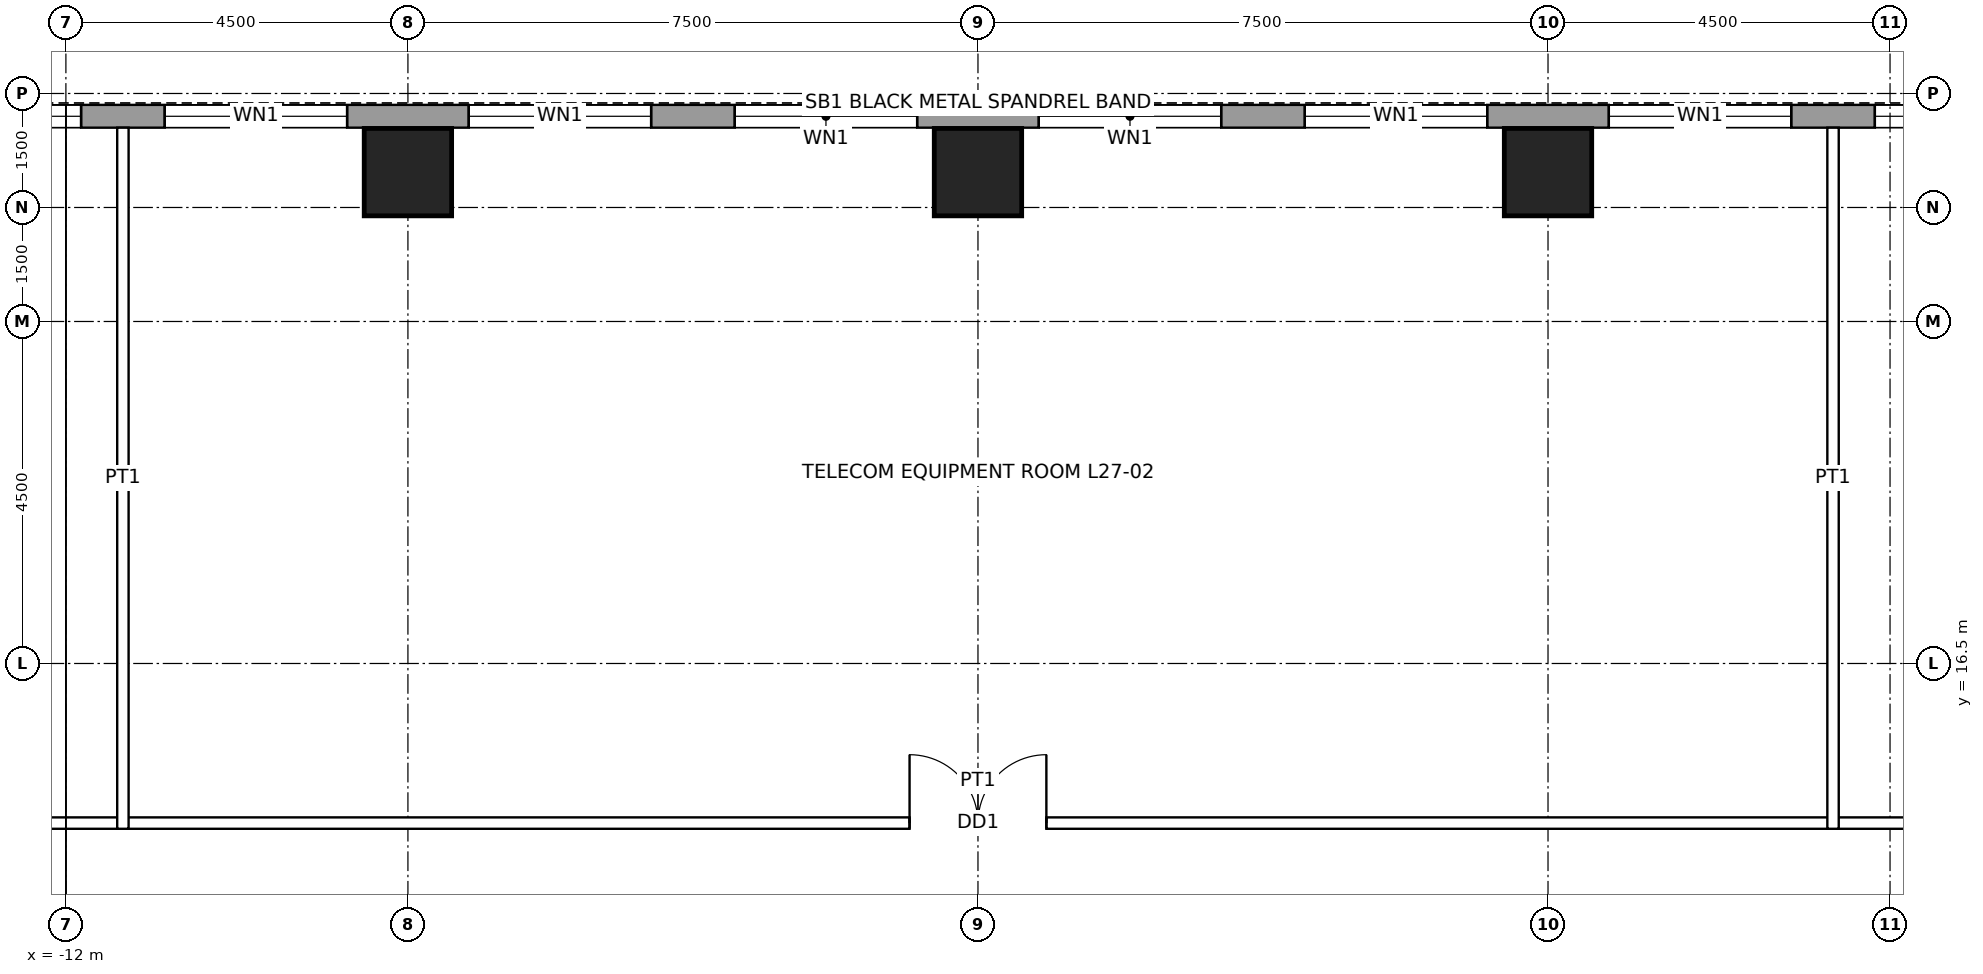
"""IFC4 building model, lengths in metres.
Left out: names, types, materials, properties, quantities, classifications, styles, units other than length and angle.
Written with IfcOpenShell. Run it as: python <this file> out.ifc"""

import sys

from ifc_helpers import new_model, si_unit, direction, frame, frame_2d, origin, origin_2d, place, context, subcontext, project, spatial, rectangle, hollow_rectangle, extrude, element, fill, save


model = new_model("IFC4")
c1 = context("Model", 3, precision=1e-05, world=origin(), true_north=direction((0.0, 1.0)))
c2 = subcontext(c1, "Body", "Model", "MODEL_VIEW")
j1 = project(units=[si_unit("LENGTHUNIT", "METRE"), si_unit("PLANEANGLEUNIT", "RADIAN")], contexts=[c1])
p1 = place(None, origin())
s1 = spatial("IfcSite", under=j1, at=p1, CompositionType="ELEMENT")
p2 = place(p1, origin())
s2 = spatial("IfcBuilding", under=s1, at=p2, CompositionType="ELEMENT")
p3 = place(p2, frame((0.0, 0.0, 135.9)))
s3 = spatial("IfcBuildingStorey", under=s2, at=p3, CompositionType="ELEMENT", Elevation=135.9)
for number, where, z_axis, x_axis in (
    (1, (-7.5, 22.965, 0.0), (0.0, 0.0, 1.0), (1.0, 0.0, 0.0)),
    (2, (0.0, 22.965, 0.0), (0.0, 0.0, 1.0), (1.0, 0.0, 0.0)),
    (3, (7.5, 22.965, 0.0), (0.0, 0.0, 1.0), (1.0, 0.0, 0.0)),
):
    element("IfcColumn", number, at=place(p3, frame(where, z_axis=z_axis, x_axis=x_axis)), inside=s3, PredefinedType="COLUMN", context=c2, shape_type="SweptSolid", body=[
        extrude(hollow_rectangle(XDim=1.15, YDim=1.15, WallThickness=0.075, at=origin_2d()), origin(), (0.0, 0.0, 1.0), 4.5),
    ])
p4 = place(p3, frame((-16.2, 23.7, 0.0), z_axis=(0.0, 0.0, 1.0), x_axis=(1.0, 0.0, 0.0)))
e4 = element("IfcWall", 4, at=p4, inside=s3, PredefinedType="SOLIDWALL", context=c2, shape_type="SweptSolid", body=[
    extrude(rectangle(XDim=32.4, YDim=0.3, at=frame_2d((16.2, 0.0))), origin(), (0.0, 0.0, 1.0), 4.3),
])
p5 = place(p4, frame((2.0, 0.0, 1.0)))
e5 = element("IfcOpeningElement", 5, at=p5, cuts=e4, PredefinedType="OPENING", context=c2, shape_type="SweptSolid", body=[
    extrude(rectangle(XDim=2.4, YDim=1.2, at=frame_2d((1.2, 0.6))), frame((0.0, 0.16, 0.0), z_axis=(0.0, -1.0, 0.0), x_axis=(1.0, 0.0, 0.0)), (0.0, 0.0, 1.0), 0.32),
])
p6 = place(p4, frame((5.5, 0.0, 1.0)))
e6 = element("IfcOpeningElement", 6, at=p6, cuts=e4, PredefinedType="OPENING", context=c2, shape_type="SweptSolid", body=[
    extrude(rectangle(XDim=2.4, YDim=1.2, at=frame_2d((1.2, 0.6))), frame((0.0, 0.16, 0.0), z_axis=(0.0, -1.0, 0.0), x_axis=(1.0, 0.0, 0.0)), (0.0, 0.0, 1.0), 0.32),
])
p7 = place(p4, frame((9.5, 0.0, 1.0)))
e7 = element("IfcOpeningElement", 7, at=p7, cuts=e4, PredefinedType="OPENING", context=c2, shape_type="SweptSolid", body=[
    extrude(rectangle(XDim=2.4, YDim=1.2, at=frame_2d((1.2, 0.6))), frame((0.0, 0.16, 0.0), z_axis=(0.0, -1.0, 0.0), x_axis=(1.0, 0.0, 0.0)), (0.0, 0.0, 1.0), 0.32),
])
p8 = place(p4, frame((13.0, 0.0, 1.0)))
e8 = element("IfcOpeningElement", 8, at=p8, cuts=e4, PredefinedType="OPENING", context=c2, shape_type="SweptSolid", body=[
    extrude(rectangle(XDim=2.4, YDim=1.2, at=frame_2d((1.2, 0.6))), frame((0.0, 0.16, 0.0), z_axis=(0.0, -1.0, 0.0), x_axis=(1.0, 0.0, 0.0)), (0.0, 0.0, 1.0), 0.32),
])
p9 = place(p4, frame((17.0, 0.0, 1.0)))
e9 = element("IfcOpeningElement", 9, at=p9, cuts=e4, PredefinedType="OPENING", context=c2, shape_type="SweptSolid", body=[
    extrude(rectangle(XDim=2.4, YDim=1.2, at=frame_2d((1.2, 0.6))), frame((0.0, 0.16, 0.0), z_axis=(0.0, -1.0, 0.0), x_axis=(1.0, 0.0, 0.0)), (0.0, 0.0, 1.0), 0.32),
])
p10 = place(p4, frame((20.5, 0.0, 1.0)))
e10 = element("IfcOpeningElement", 10, at=p10, cuts=e4, PredefinedType="OPENING", context=c2, shape_type="SweptSolid", body=[
    extrude(rectangle(XDim=2.4, YDim=1.2, at=frame_2d((1.2, 0.6))), frame((0.0, 0.16, 0.0), z_axis=(0.0, -1.0, 0.0), x_axis=(1.0, 0.0, 0.0)), (0.0, 0.0, 1.0), 0.32),
])
p11 = place(p4, frame((24.5, 0.0, 1.0)))
e11 = element("IfcOpeningElement", 11, at=p11, cuts=e4, PredefinedType="OPENING", context=c2, shape_type="SweptSolid", body=[
    extrude(rectangle(XDim=2.4, YDim=1.2, at=frame_2d((1.2, 0.6))), frame((0.0, 0.16, 0.0), z_axis=(0.0, -1.0, 0.0), x_axis=(1.0, 0.0, 0.0)), (0.0, 0.0, 1.0), 0.32),
])
p12 = place(p4, frame((28.0, 0.0, 1.0)))
e12 = element("IfcOpeningElement", 12, at=p12, cuts=e4, PredefinedType="OPENING", context=c2, shape_type="SweptSolid", body=[
    extrude(rectangle(XDim=2.4, YDim=1.2, at=frame_2d((1.2, 0.6))), frame((0.0, 0.16, 0.0), z_axis=(0.0, -1.0, 0.0), x_axis=(1.0, 0.0, 0.0)), (0.0, 0.0, 1.0), 0.32),
])
p13 = place(p3, frame((-14.475, 14.4, 0.0), z_axis=(0.0, 0.0, 1.0), x_axis=(1.0, 0.0, 0.0)))
e13 = element("IfcWall", 13, at=p13, inside=s3, PredefinedType="PARTITIONING", context=c2, shape_type="SweptSolid", body=[
    extrude(rectangle(XDim=28.95, YDim=0.15, at=frame_2d((14.475, 0.0))), origin(), (0.0, 0.0, 1.0), 4.3),
])
p14 = place(p13, frame((13.575, 0.0, 0.0)))
e14 = element("IfcOpeningElement", 14, at=p14, cuts=e13, PredefinedType="OPENING", context=c2, shape_type="SweptSolid", body=[
    extrude(rectangle(XDim=1.8, YDim=2.4, at=frame_2d((0.9, 1.2))), frame((0.0, 0.085, 0.0), z_axis=(0.0, -1.0, 0.0), x_axis=(1.0, 0.0, 0.0)), (0.0, 0.0, 1.0), 0.17),
])
p15 = place(p13, frame((26.8, 0.0, 0.0)))
e15 = element("IfcOpeningElement", 15, at=p15, cuts=e13, PredefinedType="OPENING", context=c2, shape_type="SweptSolid", body=[
    extrude(rectangle(XDim=1.0, YDim=2.1, at=frame_2d((0.5, 1.05))), frame((0.0, 0.085, 0.0), z_axis=(0.0, -1.0, 0.0), x_axis=(1.0, 0.0, 0.0)), (0.0, 0.0, 1.0), 0.17),
])
p16 = place(p13, frame((1.15, 0.0, 0.0)))
e16 = element("IfcOpeningElement", 16, at=p16, cuts=e13, PredefinedType="OPENING", context=c2, shape_type="SweptSolid", body=[
    extrude(rectangle(XDim=1.0, YDim=2.1, at=frame_2d((0.5, 1.05))), frame((0.0, 0.085, 0.0), z_axis=(0.0, -1.0, 0.0), x_axis=(1.0, 0.0, 0.0)), (0.0, 0.0, 1.0), 0.17),
])
for number, where, z_axis, x_axis in (
    (17, (-11.25, 14.325, 0.0), (0.0, 0.0, 1.0), (0.0, 1.0, 0.0)),
    (18, (11.25, 14.325, 0.0), (0.0, 0.0, 1.0), (0.0, 1.0, 0.0)),
):
    element("IfcWall", number, at=place(p3, frame(where, z_axis=z_axis, x_axis=x_axis)), inside=s3, PredefinedType="PARTITIONING", context=c2, shape_type="SweptSolid", body=[
        extrude(rectangle(XDim=9.225, YDim=0.15, at=frame_2d((4.613, 0.0))), origin(), (0.0, 0.0, 1.0), 3.431),
    ])
p17 = place(p5, origin())
e19 = element("IfcWindow", 19, at=p17, inside=s3, PartitioningType="SINGLE_PANEL", PredefinedType="WINDOW", context=c2, shape_type="SweptSolid", body=[
    extrude(rectangle(XDim=2.4, YDim=1.2, at=frame_2d((1.2, 0.6))), frame((0.0, 0.03, 0.0), z_axis=(0.0, -1.0, 0.0), x_axis=(1.0, 0.0, 0.0)), (0.0, 0.0, 1.0), 0.06),
])
fill(e5, e19)
p18 = place(p6, origin())
e20 = element("IfcWindow", 20, at=p18, inside=s3, PartitioningType="SINGLE_PANEL", PredefinedType="WINDOW", context=c2, shape_type="SweptSolid", body=[
    extrude(rectangle(XDim=2.4, YDim=1.2, at=frame_2d((1.2, 0.6))), frame((0.0, 0.03, 0.0), z_axis=(0.0, -1.0, 0.0), x_axis=(1.0, 0.0, 0.0)), (0.0, 0.0, 1.0), 0.06),
])
fill(e6, e20)
p19 = place(p7, origin())
e21 = element("IfcWindow", 21, at=p19, inside=s3, PartitioningType="SINGLE_PANEL", PredefinedType="WINDOW", context=c2, shape_type="SweptSolid", body=[
    extrude(rectangle(XDim=2.4, YDim=1.2, at=frame_2d((1.2, 0.6))), frame((0.0, 0.03, 0.0), z_axis=(0.0, -1.0, 0.0), x_axis=(1.0, 0.0, 0.0)), (0.0, 0.0, 1.0), 0.06),
])
fill(e7, e21)
p20 = place(p8, origin())
e22 = element("IfcWindow", 22, at=p20, inside=s3, PartitioningType="SINGLE_PANEL", PredefinedType="WINDOW", context=c2, shape_type="SweptSolid", body=[
    extrude(rectangle(XDim=2.4, YDim=1.2, at=frame_2d((1.2, 0.6))), frame((0.0, 0.03, 0.0), z_axis=(0.0, -1.0, 0.0), x_axis=(1.0, 0.0, 0.0)), (0.0, 0.0, 1.0), 0.06),
])
fill(e8, e22)
p21 = place(p9, origin())
e23 = element("IfcWindow", 23, at=p21, inside=s3, PartitioningType="SINGLE_PANEL", PredefinedType="WINDOW", context=c2, shape_type="SweptSolid", body=[
    extrude(rectangle(XDim=2.4, YDim=1.2, at=frame_2d((1.2, 0.6))), frame((0.0, 0.03, 0.0), z_axis=(0.0, -1.0, 0.0), x_axis=(1.0, 0.0, 0.0)), (0.0, 0.0, 1.0), 0.06),
])
fill(e9, e23)
p22 = place(p10, origin())
e24 = element("IfcWindow", 24, at=p22, inside=s3, PartitioningType="SINGLE_PANEL", PredefinedType="WINDOW", context=c2, shape_type="SweptSolid", body=[
    extrude(rectangle(XDim=2.4, YDim=1.2, at=frame_2d((1.2, 0.6))), frame((0.0, 0.03, 0.0), z_axis=(0.0, -1.0, 0.0), x_axis=(1.0, 0.0, 0.0)), (0.0, 0.0, 1.0), 0.06),
])
fill(e10, e24)
p23 = place(p11, origin())
e25 = element("IfcWindow", 25, at=p23, inside=s3, PartitioningType="SINGLE_PANEL", PredefinedType="WINDOW", context=c2, shape_type="SweptSolid", body=[
    extrude(rectangle(XDim=2.4, YDim=1.2, at=frame_2d((1.2, 0.6))), frame((0.0, 0.03, 0.0), z_axis=(0.0, -1.0, 0.0), x_axis=(1.0, 0.0, 0.0)), (0.0, 0.0, 1.0), 0.06),
])
fill(e11, e25)
p24 = place(p12, origin())
e26 = element("IfcWindow", 26, at=p24, inside=s3, PartitioningType="SINGLE_PANEL", PredefinedType="WINDOW", context=c2, shape_type="SweptSolid", body=[
    extrude(rectangle(XDim=2.4, YDim=1.2, at=frame_2d((1.2, 0.6))), frame((0.0, 0.03, 0.0), z_axis=(0.0, -1.0, 0.0), x_axis=(1.0, 0.0, 0.0)), (0.0, 0.0, 1.0), 0.06),
])
fill(e12, e26)
p25 = place(p14, origin())
e27 = element("IfcDoor", 27, at=p25, inside=s3, OperationType="DOUBLE_DOOR_SINGLE_SWING", PredefinedType="DOOR", context=c2, shape_type="SweptSolid", body=[
    extrude(rectangle(XDim=1.8, YDim=2.4, at=frame_2d((0.9, 1.2))), frame((0.0, 0.025, 0.0), z_axis=(0.0, -1.0, 0.0), x_axis=(1.0, 0.0, 0.0)), (0.0, 0.0, 1.0), 0.05),
])
fill(e14, e27)
save(model, sys.argv[1])
